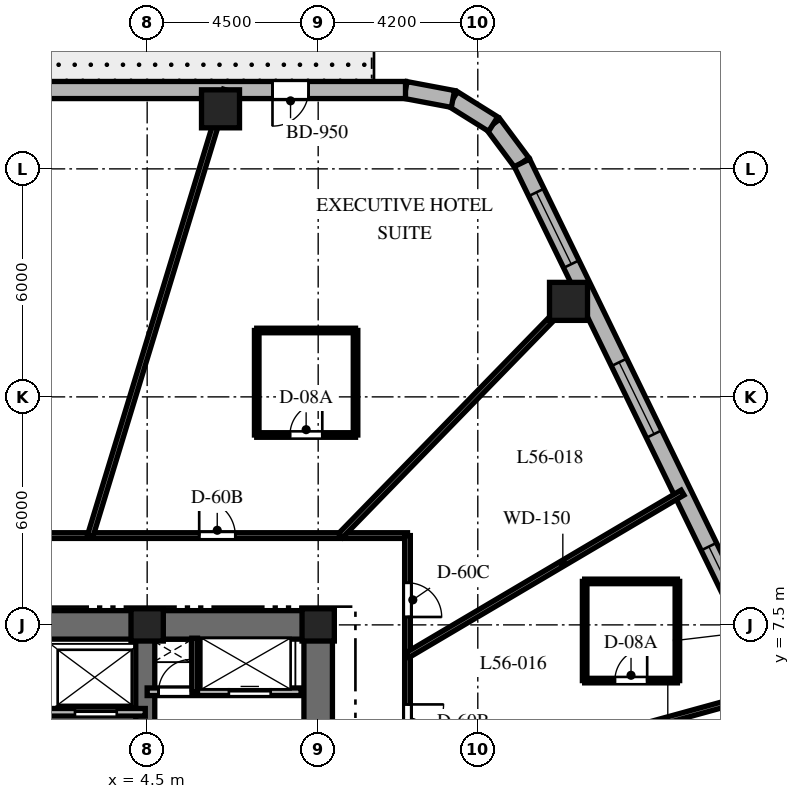
"""IFC4 building model, lengths in metres.
Left out: names, types, materials, properties, quantities, classifications, styles, units other than length and angle.
Written with IfcOpenShell. Run it as: python <this file> out.ifc"""

import sys

from ifc_helpers import new_model, si_unit, direction, frame, frame_2d, origin, origin_2d, place, context, subcontext, project, spatial, rectangle, extrude, element, fill, save


model = new_model("IFC4")
c1 = context("Model", 3, precision=1e-05, world=origin(), true_north=direction((0.0, 1.0)))
c2 = subcontext(c1, "Body", "Model", "MODEL_VIEW")
j1 = project(units=[si_unit("LENGTHUNIT", "METRE"), si_unit("PLANEANGLEUNIT", "RADIAN")], contexts=[c1])
p1 = place(None, origin())
s1 = spatial("IfcSite", under=j1, at=p1, CompositionType="ELEMENT")
p2 = place(p1, origin())
s2 = spatial("IfcBuilding", under=s1, at=p2, CompositionType="ELEMENT")
p3 = place(p2, frame((0.0, 0.0, 225.5)))
s3 = spatial("IfcBuildingStorey", under=s2, at=p3, CompositionType="ELEMENT", Elevation=225.5)
p4 = place(p3, frame((1.85, 7.5, 0.0), z_axis=(0.0, 0.0, 1.0), x_axis=(1.0, 0.0, 0.0)))
e1 = element("IfcWall", 1, at=p4, inside=s3, PredefinedType="SHEAR", context=c2, shape_type="SweptSolid", body=[
    extrude(rectangle(XDim=7.525, YDim=0.75, at=frame_2d((3.762, 0.0))), origin(), (0.0, 0.0, 1.0), 3.8),
])
p5 = place(p3, frame((9.0, -7.125, 0.0), z_axis=(0.0, 0.0, 1.0), x_axis=(0.0, 1.0, 0.0)))
e2 = element("IfcWall", 2, at=p5, inside=s3, PredefinedType="SHEAR", context=c2, shape_type="SweptSolid", body=[
    extrude(rectangle(XDim=14.25, YDim=0.75, at=frame_2d((7.125, 0.0))), origin(), (0.0, 0.0, 1.0), 3.8),
])
p6 = place(p5, frame((10.25, 0.0, 0.0)))
e3 = element("IfcOpeningElement", 3, at=p6, cuts=e2, PredefinedType="OPENING", context=c2, shape_type="SweptSolid", body=[
    extrude(rectangle(XDim=1.05, YDim=2.15, at=frame_2d((0.525, 1.075))), frame((0.0, 0.385, 0.0), z_axis=(0.0, -1.0, 0.0), x_axis=(1.0, 0.0, 0.0)), (0.0, 0.0, 1.0), 0.77),
])
p7 = place(p3, frame((4.45, 2.25, 0.0), z_axis=(0.0, 0.0, 1.0), x_axis=(0.0, 1.0, 0.0)))
e4 = element("IfcWall", 4, at=p7, inside=s3, PredefinedType="SHEAR", context=c2, shape_type="SweptSolid", body=[
    extrude(rectangle(XDim=4.875, YDim=0.5, at=frame_2d((2.438, 0.0))), origin(), (0.0, 0.0, 1.0), 3.8),
])
for number, where, z_axis, x_axis in (
    (5, (9.0, 7.5, 0.0), (0.0, 0.0, 1.0), (1.0, 0.0, 0.0)),
    (6, (4.5, 7.5, 0.0), (0.0, 0.0, 1.0), (1.0, 0.0, 0.0)),
):
    element("IfcColumn", number, at=place(p3, frame(where, z_axis=z_axis, x_axis=x_axis)), inside=s3, PredefinedType="COLUMN", context=c2, shape_type="SweptSolid", body=[
        extrude(rectangle(XDim=0.85, YDim=0.85, at=origin_2d()), origin(), (0.0, 0.0, 1.0), 3.8),
    ])
for number, where, z_axis, x_axis in (
    (7, (15.587, 16.013, 0.0), (0.0, 0.0, 1.0), (1.0, 0.0, 0.0)),
    (8, (6.43, 21.08, 0.0), (0.0, 0.0, 1.0), (1.0, 0.0, 0.0)),
):
    element("IfcColumn", number, at=place(p3, frame(where, z_axis=z_axis, x_axis=x_axis)), inside=s3, PredefinedType="COLUMN", context=c2, shape_type="SweptSolid", body=[
        extrude(rectangle(XDim=1.0, YDim=1.0, at=origin_2d()), origin(), (0.0, 0.0, 1.0), 3.8),
    ])
p8 = place(p3, frame((14.362, 19.658, 0.0), z_axis=(0.0, 0.0, 1.0), x_axis=(-0.596642462792, 0.80250717853, 0.0)))
e9 = element("IfcWall", 9, at=p8, inside=s3, PredefinedType="SOLIDWALL", context=c2, shape_type="SweptSolid", body=[
    extrude(rectangle(XDim=1.27, YDim=0.45, at=frame_2d((0.635, 0.0))), origin(), (0.0, 0.0, 1.0), 3.5),
])
p9 = place(p3, frame((13.604, 20.678, 0.0), z_axis=(0.0, 0.0, 1.0), x_axis=(-0.847910404124, 0.53013955387, 0.0)))
e10 = element("IfcWall", 10, at=p9, inside=s3, PredefinedType="SOLIDWALL", context=c2, shape_type="SweptSolid", body=[
    extrude(rectangle(XDim=1.249, YDim=0.45, at=frame_2d((0.624, 0.0))), origin(), (0.0, 0.0, 1.0), 3.5),
])
p10 = place(p3, frame((12.546, 21.34, 0.0), z_axis=(0.0, 0.0, 1.0), x_axis=(-0.982686750835, 0.18527479519, 0.0)))
e11 = element("IfcWall", 11, at=p10, inside=s3, PredefinedType="SOLIDWALL", context=c2, shape_type="SweptSolid", body=[
    extrude(rectangle(XDim=1.27, YDim=0.45, at=frame_2d((0.635, 0.0))), origin(), (0.0, 0.0, 1.0), 3.5),
])
p11 = place(p3, frame((22.74, 2.452, 0.0), z_axis=(0.0, 0.0, 1.0), x_axis=(-0.437753424814, 0.899095066755, 0.0)))
e12 = element("IfcWall", 12, at=p11, inside=s3, PredefinedType="SOLIDWALL", context=c2, shape_type="SweptSolid", body=[
    extrude(rectangle(XDim=19.137, YDim=0.45, at=frame_2d((9.569, 0.0))), origin(), (0.0, 0.0, 1.0), 3.5),
])
p12 = place(p11, frame((5.805, 0.0, 0.8)))
e13 = element("IfcOpeningElement", 13, at=p12, cuts=e12, PredefinedType="OPENING", context=c2, shape_type="SweptSolid", body=[
    extrude(rectangle(XDim=2.1, YDim=1.85, at=frame_2d((1.05, 0.925))), frame((0.0, 0.235, 0.0), z_axis=(0.0, -1.0, 0.0), x_axis=(1.0, 0.0, 0.0)), (0.0, 0.0, 1.0), 0.47),
])
p13 = place(p11, frame((11.199, 0.0, 0.8)))
e14 = element("IfcOpeningElement", 14, at=p13, cuts=e12, PredefinedType="OPENING", context=c2, shape_type="SweptSolid", body=[
    extrude(rectangle(XDim=2.1, YDim=1.85, at=frame_2d((1.05, 0.925))), frame((0.0, 0.235, 0.0), z_axis=(0.0, -1.0, 0.0), x_axis=(1.0, 0.0, 0.0)), (0.0, 0.0, 1.0), 0.47),
])
p14 = place(p11, frame((16.173, 0.0, 0.8)))
e15 = element("IfcOpeningElement", 15, at=p14, cuts=e12, PredefinedType="OPENING", context=c2, shape_type="SweptSolid", body=[
    extrude(rectangle(XDim=2.1, YDim=1.85, at=frame_2d((1.05, 0.925))), frame((0.0, 0.235, 0.0), z_axis=(0.0, -1.0, 0.0), x_axis=(1.0, 0.0, 0.0)), (0.0, 0.0, 1.0), 0.47),
])
p15 = place(p11, frame((0.916, 0.0, 0.8)))
e16 = element("IfcOpeningElement", 16, at=p15, cuts=e12, PredefinedType="OPENING", context=c2, shape_type="SweptSolid", body=[
    extrude(rectangle(XDim=2.1, YDim=1.85, at=frame_2d((1.05, 0.925))), frame((0.0, 0.235, 0.0), z_axis=(0.0, -1.0, 0.0), x_axis=(1.0, 0.0, 0.0)), (0.0, 0.0, 1.0), 0.47),
])
p16 = place(p3, frame((11.298, 21.575, 0.0), z_axis=(0.0, 0.0, 1.0), x_axis=(-1.0, 0.0, 0.0)))
e17 = element("IfcWall", 17, at=p16, inside=s3, PredefinedType="SOLIDWALL", context=c2, shape_type="SweptSolid", body=[
    extrude(rectangle(XDim=24.399, YDim=0.45, at=frame_2d((12.2, 0.0))), origin(), (0.0, 0.0, 1.0), 3.5),
])
p17 = place(p16, frame((2.55, 0.0, 0.0)))
e18 = element("IfcOpeningElement", 18, at=p17, cuts=e17, PredefinedType="OPENING", context=c2, shape_type="SweptSolid", body=[
    extrude(rectangle(XDim=0.95, YDim=2.15, at=frame_2d((0.475, 1.075))), frame((0.0, 0.235, 0.0), z_axis=(0.0, -1.0, 0.0), x_axis=(1.0, 0.0, 0.0)), (0.0, 0.0, 1.0), 0.47),
])
p18 = place(p16, frame((11.451, 0.0, 0.8)))
e19 = element("IfcOpeningElement", 19, at=p18, cuts=e17, PredefinedType="OPENING", context=c2, shape_type="SweptSolid", body=[
    extrude(rectangle(XDim=1.5, YDim=1.8, at=frame_2d((0.75, 0.9))), frame((0.0, 0.235, 0.0), z_axis=(0.0, -1.0, 0.0), x_axis=(1.0, 0.0, 0.0)), (0.0, 0.0, 1.0), 0.47),
])
p19 = place(p16, frame((21.296, 0.0, 0.8)))
e20 = element("IfcOpeningElement", 20, at=p19, cuts=e17, PredefinedType="OPENING", context=c2, shape_type="SweptSolid", body=[
    extrude(rectangle(XDim=1.5, YDim=1.8, at=frame_2d((0.75, 0.9))), frame((0.0, 0.235, 0.0), z_axis=(0.0, -1.0, 0.0), x_axis=(1.0, 0.0, 0.0)), (0.0, 0.0, 1.0), 0.47),
])
p20 = place(p3, frame((4.5, 5.74, 0.0), z_axis=(0.0, 0.0, 1.0), x_axis=(1.0, 0.0, 0.0)))
e21 = element("IfcWall", 21, at=p20, inside=s3, PredefinedType="PARTITIONING", context=c2, shape_type="SweptSolid", body=[
    extrude(rectangle(XDim=4.05, YDim=0.2, at=frame_2d((2.025, 0.0))), origin(), (0.0, 0.0, 1.0), 3.5),
])
p21 = place(p20, frame((0.3, 0.0, 0.0)))
e22 = element("IfcOpeningElement", 22, at=p21, cuts=e21, PredefinedType="OPENING", context=c2, shape_type="SweptSolid", body=[
    extrude(rectangle(XDim=0.85, YDim=2.03, at=frame_2d((0.425, 1.015))), frame((0.0, 0.11, 0.0), z_axis=(0.0, -1.0, 0.0), x_axis=(1.0, 0.0, 0.0)), (0.0, 0.0, 1.0), 0.22),
])
p22 = place(p20, frame((2.15, 0.0, 0.0)))
e23 = element("IfcOpeningElement", 23, at=p22, cuts=e21, PredefinedType="OPENING", context=c2, shape_type="SweptSolid", body=[
    extrude(rectangle(XDim=1.1, YDim=2.2, at=frame_2d((0.55, 1.1))), frame((0.0, 0.11, 0.0), z_axis=(0.0, -1.0, 0.0), x_axis=(1.0, 0.0, 0.0)), (0.0, 0.0, 1.0), 0.22),
])
p23 = place(p3, frame((5.75, 5.74, 0.0), z_axis=(0.0, 0.0, 1.0), x_axis=(0.0, 1.0, 0.0)))
e24 = element("IfcWall", 24, at=p23, inside=s3, PredefinedType="PARTITIONING", context=c2, shape_type="SweptSolid", body=[
    extrude(rectangle(XDim=1.41, YDim=0.15, at=frame_2d((0.705, 0.0))), origin(), (0.0, 0.0, 1.0), 3.5),
])
p24 = place(p3, frame((1.85, 5.2, 0.0), z_axis=(0.0, 0.0, 1.0), x_axis=(1.0, 0.0, 0.0)))
e25 = element("IfcWall", 25, at=p24, inside=s3, PredefinedType="PARTITIONING", context=c2, shape_type="SweptSolid", body=[
    extrude(rectangle(XDim=2.6, YDim=0.2, at=frame_2d((1.3, 0.0))), origin(), (0.0, 0.0, 1.0), 3.5),
])
p25 = place(p24, frame((0.75, 0.0, 0.0)))
e26 = element("IfcOpeningElement", 26, at=p25, cuts=e25, PredefinedType="OPENING", context=c2, shape_type="SweptSolid", body=[
    extrude(rectangle(XDim=1.1, YDim=2.2, at=frame_2d((0.55, 1.1))), frame((0.0, 0.11, 0.0), z_axis=(0.0, -1.0, 0.0), x_axis=(1.0, 0.0, 0.0)), (0.0, 0.0, 1.0), 0.22),
])
p26 = place(p3, frame((0.92, 9.85, 0.0), z_axis=(0.0, 0.0, 1.0), x_axis=(1.0, 0.0, 0.0)))
e27 = element("IfcWall", 27, at=p26, inside=s3, PredefinedType="PARTITIONING", context=c2, shape_type="SweptSolid", body=[
    extrude(rectangle(XDim=10.43, YDim=0.15, at=frame_2d((5.215, 0.0))), origin(), (0.0, 0.0, 1.0), 2.99),
])
p27 = place(p26, frame((4.949, 0.0, 0.0)))
e28 = element("IfcOpeningElement", 28, at=p27, cuts=e27, PredefinedType="OPENING", context=c2, shape_type="SweptSolid", body=[
    extrude(rectangle(XDim=0.95, YDim=2.03, at=frame_2d((0.475, 1.015))), frame((0.0, 0.085, 0.0), z_axis=(0.0, -1.0, 0.0), x_axis=(1.0, 0.0, 0.0)), (0.0, 0.0, 1.0), 0.17),
])
p28 = place(p3, frame((11.35, 9.85, 0.0), z_axis=(0.0, 0.0, 1.0), x_axis=(0.0, -1.0, 0.0)))
e29 = element("IfcWall", 29, at=p28, inside=s3, PredefinedType="PARTITIONING", context=c2, shape_type="SweptSolid", body=[
    extrude(rectangle(XDim=12.4, YDim=0.15, at=frame_2d((6.2, 0.0))), origin(), (0.0, 0.0, 1.0), 2.99),
])
p29 = place(p28, frame((4.443, 0.0, 0.0)))
e30 = element("IfcOpeningElement", 30, at=p29, cuts=e29, PredefinedType="OPENING", context=c2, shape_type="SweptSolid", body=[
    extrude(rectangle(XDim=0.95, YDim=2.03, at=frame_2d((0.475, 1.015))), frame((0.0, 0.085, 0.0), z_axis=(0.0, -1.0, 0.0), x_axis=(1.0, 0.0, 0.0)), (0.0, 0.0, 1.0), 0.17),
])
p30 = place(p28, frame((1.242, 0.0, 0.0)))
e31 = element("IfcOpeningElement", 31, at=p30, cuts=e29, PredefinedType="OPENING", context=c2, shape_type="SweptSolid", body=[
    extrude(rectangle(XDim=0.9, YDim=2.03, at=frame_2d((0.45, 1.015))), frame((0.0, 0.085, 0.0), z_axis=(0.0, -1.0, 0.0), x_axis=(1.0, 0.0, 0.0)), (0.0, 0.0, 1.0), 0.17),
])
p31 = place(p28, frame((8.835, 0.0, 0.0)))
e32 = element("IfcOpeningElement", 32, at=p31, cuts=e29, PredefinedType="OPENING", context=c2, shape_type="SweptSolid", body=[
    extrude(rectangle(XDim=0.95, YDim=2.03, at=frame_2d((0.475, 1.015))), frame((0.0, 0.085, 0.0), z_axis=(0.0, -1.0, 0.0), x_axis=(1.0, 0.0, 0.0)), (0.0, 0.0, 1.0), 0.17),
])
p32 = place(p3, frame((11.35, 3.121, 0.0), z_axis=(0.0, 0.0, 1.0), x_axis=(0.964212793822, 0.265129568758, 0.0)))
e33 = element("IfcWall", 33, at=p32, inside=s3, PredefinedType="PARTITIONING", context=c2, shape_type="SweptSolid", body=[
    extrude(rectangle(XDim=10.12, YDim=0.15, at=frame_2d((5.06, 0.0))), origin(), (0.0, 0.0, 1.0), 2.74),
])
p33 = place(p3, frame((11.35, 6.705, 0.0), z_axis=(0.0, 0.0, 1.0), x_axis=(0.86097625004, 0.508645158108, 0.0)))
e34 = element("IfcWall", 34, at=p33, inside=s3, PredefinedType="PARTITIONING", context=c2, shape_type="SweptSolid", body=[
    extrude(rectangle(XDim=8.406, YDim=0.15, at=frame_2d((4.203, 0.0))), origin(), (0.0, 0.0, 1.0), 2.74),
])
p34 = place(p3, frame((9.588, 9.85, 0.0), z_axis=(0.0, 0.0, 1.0), x_axis=(0.697519469595, 0.716565830567, 0.0)))
e35 = element("IfcWall", 35, at=p34, inside=s3, PredefinedType="PARTITIONING", context=c2, shape_type="SweptSolid", body=[
    extrude(rectangle(XDim=9.126, YDim=0.15, at=frame_2d((4.563, 0.0))), origin(), (0.0, 0.0, 1.0), 2.74),
])
p35 = place(p3, frame((3.004, 9.85, 0.0), z_axis=(0.0, 0.0, 1.0), x_axis=(0.291775760688, 0.956486751333, 0.0)))
e36 = element("IfcWall", 36, at=p35, inside=s3, PredefinedType="PARTITIONING", context=c2, shape_type="SweptSolid", body=[
    extrude(rectangle(XDim=12.258, YDim=0.15, at=frame_2d((6.129, 0.0))), origin(), (0.0, 0.0, 1.0), 2.74),
])
p36 = place(p3, frame((16.012, 6.034, 0.0), z_axis=(0.0, 0.0, 1.0), x_axis=(1.0, 0.0, 0.0)))
e37 = element("IfcWall", 37, at=p36, inside=s3, PredefinedType="PARTITIONING", context=c2, shape_type="SweptSolid", body=[
    extrude(rectangle(XDim=2.44, YDim=0.12, at=frame_2d((1.22, 0.0))), origin(), (0.0, 0.0, 1.0), 2.94),
])
p37 = place(p36, frame((0.795, 0.0, 0.0)))
e38 = element("IfcOpeningElement", 38, at=p37, cuts=e37, PredefinedType="OPENING", context=c2, shape_type="SweptSolid", body=[
    extrude(rectangle(XDim=0.85, YDim=2.03, at=frame_2d((0.425, 1.015))), frame((0.0, 0.07, 0.0), z_axis=(0.0, -1.0, 0.0), x_axis=(1.0, 0.0, 0.0)), (0.0, 0.0, 1.0), 0.14),
])
p38 = place(p3, frame((18.452, 6.034, 0.0), z_axis=(0.0, 0.0, 1.0), x_axis=(0.0, 1.0, 0.0)))
e39 = element("IfcWall", 39, at=p38, inside=s3, PredefinedType="PARTITIONING", context=c2, shape_type="SweptSolid", body=[
    extrude(rectangle(XDim=2.61, YDim=0.12, at=frame_2d((1.305, 0.0))), origin(), (0.0, 0.0, 1.0), 2.99),
])
p39 = place(p3, frame((18.452, 8.644, 0.0), z_axis=(0.0, 0.0, 1.0), x_axis=(-1.0, 0.0, 0.0)))
e40 = element("IfcWall", 40, at=p39, inside=s3, PredefinedType="PARTITIONING", context=c2, shape_type="SweptSolid", body=[
    extrude(rectangle(XDim=2.44, YDim=0.12, at=frame_2d((1.22, 0.0))), origin(), (0.0, 0.0, 1.0), 3.5),
])
p40 = place(p3, frame((16.012, 8.644, 0.0), z_axis=(0.0, 0.0, 1.0), x_axis=(0.0, -1.0, 0.0)))
e41 = element("IfcWall", 41, at=p40, inside=s3, PredefinedType="PARTITIONING", context=c2, shape_type="SweptSolid", body=[
    extrude(rectangle(XDim=2.61, YDim=0.12, at=frame_2d((1.305, 0.0))), origin(), (0.0, 0.0, 1.0), 2.99),
])
p41 = place(p3, frame((7.383, 12.497, 0.0), z_axis=(0.0, 0.0, 1.0), x_axis=(1.0, 0.0, 0.0)))
e42 = element("IfcWall", 42, at=p41, inside=s3, PredefinedType="PARTITIONING", context=c2, shape_type="SweptSolid", body=[
    extrude(rectangle(XDim=2.6, YDim=0.12, at=frame_2d((1.3, 0.0))), origin(), (0.0, 0.0, 1.0), 2.94),
])
p42 = place(p41, frame((0.875, 0.0, 0.0)))
e43 = element("IfcOpeningElement", 43, at=p42, cuts=e42, PredefinedType="OPENING", context=c2, shape_type="SweptSolid", body=[
    extrude(rectangle(XDim=0.85, YDim=2.03, at=frame_2d((0.425, 1.015))), frame((0.0, 0.07, 0.0), z_axis=(0.0, -1.0, 0.0), x_axis=(1.0, 0.0, 0.0)), (0.0, 0.0, 1.0), 0.14),
])
p43 = place(p3, frame((9.983, 12.497, 0.0), z_axis=(0.0, 0.0, 1.0), x_axis=(0.0, 1.0, 0.0)))
e44 = element("IfcWall", 44, at=p43, inside=s3, PredefinedType="PARTITIONING", context=c2, shape_type="SweptSolid", body=[
    extrude(rectangle(XDim=2.75, YDim=0.12, at=frame_2d((1.375, 0.0))), origin(), (0.0, 0.0, 1.0), 3.073),
])
p44 = place(p3, frame((9.983, 15.247, 0.0), z_axis=(0.0, 0.0, 1.0), x_axis=(-1.0, 0.0, 0.0)))
e45 = element("IfcWall", 45, at=p44, inside=s3, PredefinedType="PARTITIONING", context=c2, shape_type="SweptSolid", body=[
    extrude(rectangle(XDim=2.6, YDim=0.12, at=frame_2d((1.3, 0.0))), origin(), (0.0, 0.0, 1.0), 3.073),
])
p45 = place(p3, frame((7.383, 15.247, 0.0), z_axis=(0.0, 0.0, 1.0), x_axis=(0.0, -1.0, 0.0)))
e46 = element("IfcWall", 46, at=p45, inside=s3, PredefinedType="PARTITIONING", context=c2, shape_type="SweptSolid", body=[
    extrude(rectangle(XDim=2.75, YDim=0.12, at=frame_2d((1.375, 0.0))), origin(), (0.0, 0.0, 1.0), 2.94),
])
p46 = place(p12, origin())
e47 = element("IfcWindow", 47, at=p46, inside=s3, PartitioningType="SINGLE_PANEL", PredefinedType="WINDOW", context=c2, shape_type="SweptSolid", body=[
    extrude(rectangle(XDim=2.1, YDim=1.85, at=frame_2d((1.05, 0.925))), frame((0.0, 0.03, 0.0), z_axis=(0.0, -1.0, 0.0), x_axis=(1.0, 0.0, 0.0)), (0.0, 0.0, 1.0), 0.06),
])
fill(e13, e47)
p47 = place(p13, origin())
e48 = element("IfcWindow", 48, at=p47, inside=s3, PartitioningType="SINGLE_PANEL", PredefinedType="WINDOW", context=c2, shape_type="SweptSolid", body=[
    extrude(rectangle(XDim=2.1, YDim=1.85, at=frame_2d((1.05, 0.925))), frame((0.0, 0.03, 0.0), z_axis=(0.0, -1.0, 0.0), x_axis=(1.0, 0.0, 0.0)), (0.0, 0.0, 1.0), 0.06),
])
fill(e14, e48)
p48 = place(p14, origin())
e49 = element("IfcWindow", 49, at=p48, inside=s3, PartitioningType="SINGLE_PANEL", PredefinedType="WINDOW", context=c2, shape_type="SweptSolid", body=[
    extrude(rectangle(XDim=2.1, YDim=1.85, at=frame_2d((1.05, 0.925))), frame((0.0, 0.03, 0.0), z_axis=(0.0, -1.0, 0.0), x_axis=(1.0, 0.0, 0.0)), (0.0, 0.0, 1.0), 0.06),
])
fill(e15, e49)
p49 = place(p17, origin())
e50 = element("IfcDoor", 50, at=p49, inside=s3, OperationType="SINGLE_SWING_RIGHT", PredefinedType="DOOR", context=c2, shape_type="SweptSolid", body=[
    extrude(rectangle(XDim=0.95, YDim=2.15, at=frame_2d((0.475, 1.075))), frame((0.0, 0.025, 0.0), z_axis=(0.0, -1.0, 0.0), x_axis=(1.0, 0.0, 0.0)), (0.0, 0.0, 1.0), 0.05),
])
fill(e18, e50)
p50 = place(p21, origin())
e51 = element("IfcDoor", 51, at=p50, inside=s3, OperationType="SINGLE_SWING_RIGHT", PredefinedType="DOOR", context=c2, shape_type="SweptSolid", body=[
    extrude(rectangle(XDim=0.85, YDim=2.03, at=frame_2d((0.425, 1.015))), frame((0.0, 0.025, 0.0), z_axis=(0.0, -1.0, 0.0), x_axis=(1.0, 0.0, 0.0)), (0.0, 0.0, 1.0), 0.05),
])
fill(e22, e51)
p51 = place(p22, origin())
e52 = element("IfcDoor", 52, at=p51, inside=s3, OperationType="SLIDING_TO_RIGHT", PredefinedType="DOOR", context=c2, shape_type="SweptSolid", body=[
    extrude(rectangle(XDim=1.1, YDim=2.2, at=frame_2d((0.55, 1.1))), frame((0.0, 0.025, 0.0), z_axis=(0.0, -1.0, 0.0), x_axis=(1.0, 0.0, 0.0)), (0.0, 0.0, 1.0), 0.05),
])
fill(e23, e52)
p52 = place(p25, origin())
e53 = element("IfcDoor", 53, at=p52, inside=s3, OperationType="SLIDING_TO_RIGHT", PredefinedType="DOOR", context=c2, shape_type="SweptSolid", body=[
    extrude(rectangle(XDim=1.1, YDim=2.2, at=frame_2d((0.55, 1.1))), frame((0.0, 0.025, 0.0), z_axis=(0.0, -1.0, 0.0), x_axis=(1.0, 0.0, 0.0)), (0.0, 0.0, 1.0), 0.05),
])
fill(e26, e53)
p53 = place(p29, origin())
e54 = element("IfcDoor", 54, at=p53, inside=s3, OperationType="SINGLE_SWING_LEFT", PredefinedType="DOOR", context=c2, shape_type="SweptSolid", body=[
    extrude(rectangle(XDim=0.95, YDim=2.03, at=frame_2d((0.475, 1.015))), frame((0.0, 0.025, 0.0), z_axis=(0.0, -1.0, 0.0), x_axis=(1.0, 0.0, 0.0)), (0.0, 0.0, 1.0), 0.05),
])
fill(e30, e54)
p54 = place(p37, origin())
e55 = element("IfcDoor", 55, at=p54, inside=s3, OperationType="SINGLE_SWING_RIGHT", PredefinedType="DOOR", context=c2, shape_type="SweptSolid", body=[
    extrude(rectangle(XDim=0.85, YDim=2.03, at=frame_2d((0.425, 1.015))), frame((0.0, 0.025, 0.0), z_axis=(0.0, -1.0, 0.0), x_axis=(1.0, 0.0, 0.0)), (0.0, 0.0, 1.0), 0.05),
])
fill(e38, e55)
p55 = place(p30, origin())
e56 = element("IfcDoor", 56, at=p55, inside=s3, OperationType="SINGLE_SWING_RIGHT", PredefinedType="DOOR", context=c2, shape_type="SweptSolid", body=[
    extrude(rectangle(XDim=0.9, YDim=2.03, at=frame_2d((0.45, 1.015))), frame((0.0, 0.025, 0.0), z_axis=(0.0, -1.0, 0.0), x_axis=(1.0, 0.0, 0.0)), (0.0, 0.0, 1.0), 0.05),
])
fill(e31, e56)
p56 = place(p27, origin())
e57 = element("IfcDoor", 57, at=p56, inside=s3, OperationType="SINGLE_SWING_LEFT", PredefinedType="DOOR", context=c2, shape_type="SweptSolid", body=[
    extrude(rectangle(XDim=0.95, YDim=2.03, at=frame_2d((0.475, 1.015))), frame((0.0, 0.025, 0.0), z_axis=(0.0, -1.0, 0.0), x_axis=(1.0, 0.0, 0.0)), (0.0, 0.0, 1.0), 0.05),
])
fill(e28, e57)
p57 = place(p42, origin())
e58 = element("IfcDoor", 58, at=p57, inside=s3, OperationType="SINGLE_SWING_RIGHT", PredefinedType="DOOR", context=c2, shape_type="SweptSolid", body=[
    extrude(rectangle(XDim=0.85, YDim=2.03, at=frame_2d((0.425, 1.015))), frame((0.0, 0.025, 0.0), z_axis=(0.0, -1.0, 0.0), x_axis=(1.0, 0.0, 0.0)), (0.0, 0.0, 1.0), 0.05),
])
fill(e43, e58)
save(model, sys.argv[1])
